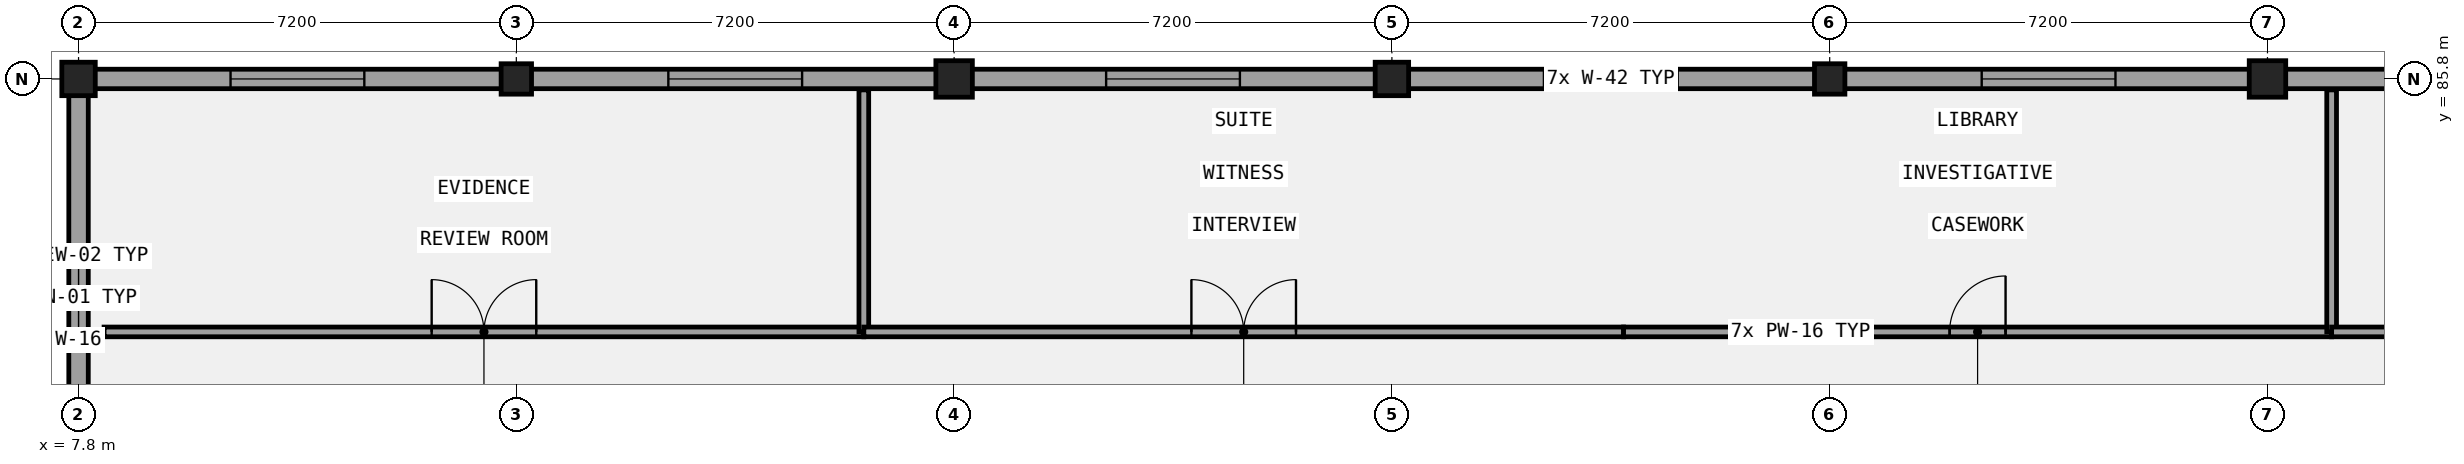
"""IFC4 building model, lengths in metres.
Left out: names, types, materials, properties, quantities, classifications, styles, units other than length and angle.
Written with IfcOpenShell. Run it as: python <this file> out.ifc"""

import sys

from ifc_helpers import new_model, si_unit, direction, frame, frame_2d, origin, origin_2d, place, context, subcontext, project, spatial, rectangle, extrude, element, fill, save


model = new_model("IFC4")
c1 = context("Model", 3, precision=1e-05, world=origin(), true_north=direction((0.0, 1.0)))
c2 = subcontext(c1, "Body", "Model", "MODEL_VIEW")
j1 = project(units=[si_unit("LENGTHUNIT", "METRE"), si_unit("PLANEANGLEUNIT", "RADIAN")], contexts=[c1])
p1 = place(None, origin())
s1 = spatial("IfcSite", under=j1, at=p1, CompositionType="ELEMENT")
p2 = place(p1, origin())
s2 = spatial("IfcBuilding", under=s1, at=p2, CompositionType="ELEMENT")
p3 = place(p2, frame((0.0, 0.0, 18.0)))
s3 = spatial("IfcBuildingStorey", under=s2, at=p3, CompositionType="ELEMENT", Elevation=18.0)
p4 = place(p3, frame((7.8, 85.8, 0.0), z_axis=(0.0, 0.0, 1.0), x_axis=(1.0, 0.0, 0.0)))
e1 = element("IfcColumn", 1, at=p4, inside=s3, PredefinedType="COLUMN", context=c2, shape_type="SweptSolid", body=[
    extrude(rectangle(XDim=0.55, YDim=0.55, at=origin_2d()), origin(), (0.0, 0.0, 1.0), 4.2),
])
p5 = place(p3, frame((15.0, 85.8, 0.0), z_axis=(0.0, 0.0, 1.0), x_axis=(1.0, 0.0, 0.0)))
e2 = element("IfcColumn", 2, at=p5, inside=s3, PredefinedType="COLUMN", context=c2, shape_type="SweptSolid", body=[
    extrude(rectangle(XDim=0.5, YDim=0.5, at=origin_2d()), origin(), (0.0, 0.0, 1.0), 4.2),
])
p6 = place(p3, frame((22.2, 85.8, 0.0), z_axis=(0.0, 0.0, 1.0), x_axis=(1.0, 0.0, 0.0)))
e3 = element("IfcColumn", 3, at=p6, inside=s3, PredefinedType="COLUMN", context=c2, shape_type="SweptSolid", body=[
    extrude(rectangle(XDim=0.6, YDim=0.6, at=origin_2d()), origin(), (0.0, 0.0, 1.0), 4.2),
])
p7 = place(p3, frame((29.4, 85.8, 0.0), z_axis=(0.0, 0.0, 1.0), x_axis=(1.0, 0.0, 0.0)))
e4 = element("IfcColumn", 4, at=p7, inside=s3, PredefinedType="COLUMN", context=c2, shape_type="SweptSolid", body=[
    extrude(rectangle(XDim=0.55, YDim=0.55, at=origin_2d()), origin(), (0.0, 0.0, 1.0), 4.2),
])
p8 = place(p3, frame((36.6, 85.8, 0.0), z_axis=(0.0, 0.0, 1.0), x_axis=(1.0, 0.0, 0.0)))
e5 = element("IfcColumn", 5, at=p8, inside=s3, PredefinedType="COLUMN", context=c2, shape_type="SweptSolid", body=[
    extrude(rectangle(XDim=0.5, YDim=0.5, at=origin_2d()), origin(), (0.0, 0.0, 1.0), 4.2),
])
p9 = place(p3, frame((43.8, 85.8, 0.0), z_axis=(0.0, 0.0, 1.0), x_axis=(1.0, 0.0, 0.0)))
e6 = element("IfcColumn", 6, at=p9, inside=s3, PredefinedType="COLUMN", context=c2, shape_type="SweptSolid", body=[
    extrude(rectangle(XDim=0.6, YDim=0.6, at=origin_2d()), origin(), (0.0, 0.0, 1.0), 4.2),
])
p10 = place(p3, frame((108.76, 85.8, 0.0), z_axis=(0.0, 0.0, 1.0), x_axis=(-1.0, 0.0, 0.0)))
e7 = element("IfcWall", 7, at=p10, inside=s3, PredefinedType="SOLIDWALL", context=c2, shape_type="SweptSolid", body=[
    extrude(rectangle(XDim=101.12, YDim=0.32, at=frame_2d((50.56, 0.0))), origin(), (0.0, 0.0, 1.0), 2.94),
])
p11 = place(p10, frame((96.26, 0.0, 1.0)))
e8 = element("IfcOpeningElement", 8, at=p11, cuts=e7, PredefinedType="OPENING", context=c2, shape_type="SweptSolid", body=[
    extrude(rectangle(XDim=2.2, YDim=1.65, at=frame_2d((1.1, 0.825))), frame((0.0, 0.17, 0.0), z_axis=(0.0, -1.0, 0.0), x_axis=(1.0, 0.0, 0.0)), (0.0, 0.0, 1.0), 0.34),
])
p12 = place(p10, frame((89.06, 0.0, 1.0)))
e9 = element("IfcOpeningElement", 9, at=p12, cuts=e7, PredefinedType="OPENING", context=c2, shape_type="SweptSolid", body=[
    extrude(rectangle(XDim=2.2, YDim=1.65, at=frame_2d((1.1, 0.825))), frame((0.0, 0.17, 0.0), z_axis=(0.0, -1.0, 0.0), x_axis=(1.0, 0.0, 0.0)), (0.0, 0.0, 1.0), 0.34),
])
p13 = place(p10, frame((81.86, 0.0, 1.0)))
e10 = element("IfcOpeningElement", 10, at=p13, cuts=e7, PredefinedType="OPENING", context=c2, shape_type="SweptSolid", body=[
    extrude(rectangle(XDim=2.2, YDim=1.65, at=frame_2d((1.1, 0.825))), frame((0.0, 0.17, 0.0), z_axis=(0.0, -1.0, 0.0), x_axis=(1.0, 0.0, 0.0)), (0.0, 0.0, 1.0), 0.34),
])
p14 = place(p10, frame((74.66, 0.0, 1.0)))
e11 = element("IfcOpeningElement", 11, at=p14, cuts=e7, PredefinedType="OPENING", context=c2, shape_type="SweptSolid", body=[
    extrude(rectangle(XDim=2.2, YDim=1.65, at=frame_2d((1.1, 0.825))), frame((0.0, 0.17, 0.0), z_axis=(0.0, -1.0, 0.0), x_axis=(1.0, 0.0, 0.0)), (0.0, 0.0, 1.0), 0.34),
])
p15 = place(p10, frame((67.46, 0.0, 1.0)))
e12 = element("IfcOpeningElement", 12, at=p15, cuts=e7, PredefinedType="OPENING", context=c2, shape_type="SweptSolid", body=[
    extrude(rectangle(XDim=2.2, YDim=1.65, at=frame_2d((1.1, 0.825))), frame((0.0, 0.17, 0.0), z_axis=(0.0, -1.0, 0.0), x_axis=(1.0, 0.0, 0.0)), (0.0, 0.0, 1.0), 0.34),
])
p16 = place(p10, frame((60.26, 0.0, 1.0)))
e13 = element("IfcOpeningElement", 13, at=p16, cuts=e7, PredefinedType="OPENING", context=c2, shape_type="SweptSolid", body=[
    extrude(rectangle(XDim=2.2, YDim=1.65, at=frame_2d((1.1, 0.825))), frame((0.0, 0.17, 0.0), z_axis=(0.0, -1.0, 0.0), x_axis=(1.0, 0.0, 0.0)), (0.0, 0.0, 1.0), 0.34),
])
p17 = place(p10, frame((53.06, 0.0, 1.0)))
e14 = element("IfcOpeningElement", 14, at=p17, cuts=e7, PredefinedType="OPENING", context=c2, shape_type="SweptSolid", body=[
    extrude(rectangle(XDim=2.2, YDim=1.65, at=frame_2d((1.1, 0.825))), frame((0.0, 0.17, 0.0), z_axis=(0.0, -1.0, 0.0), x_axis=(1.0, 0.0, 0.0)), (0.0, 0.0, 1.0), 0.34),
])
p18 = place(p10, frame((45.86, 0.0, 1.0)))
e15 = element("IfcOpeningElement", 15, at=p18, cuts=e7, PredefinedType="OPENING", context=c2, shape_type="SweptSolid", body=[
    extrude(rectangle(XDim=2.2, YDim=1.65, at=frame_2d((1.1, 0.825))), frame((0.0, 0.17, 0.0), z_axis=(0.0, -1.0, 0.0), x_axis=(1.0, 0.0, 0.0)), (0.0, 0.0, 1.0), 0.34),
])
p19 = place(p10, frame((38.66, 0.0, 1.0)))
e16 = element("IfcOpeningElement", 16, at=p19, cuts=e7, PredefinedType="OPENING", context=c2, shape_type="SweptSolid", body=[
    extrude(rectangle(XDim=2.2, YDim=1.65, at=frame_2d((1.1, 0.825))), frame((0.0, 0.17, 0.0), z_axis=(0.0, -1.0, 0.0), x_axis=(1.0, 0.0, 0.0)), (0.0, 0.0, 1.0), 0.34),
])
p20 = place(p10, frame((31.46, 0.0, 1.0)))
e17 = element("IfcOpeningElement", 17, at=p20, cuts=e7, PredefinedType="OPENING", context=c2, shape_type="SweptSolid", body=[
    extrude(rectangle(XDim=2.2, YDim=1.65, at=frame_2d((1.1, 0.825))), frame((0.0, 0.17, 0.0), z_axis=(0.0, -1.0, 0.0), x_axis=(1.0, 0.0, 0.0)), (0.0, 0.0, 1.0), 0.34),
])
p21 = place(p10, frame((24.26, 0.0, 1.0)))
e18 = element("IfcOpeningElement", 18, at=p21, cuts=e7, PredefinedType="OPENING", context=c2, shape_type="SweptSolid", body=[
    extrude(rectangle(XDim=2.2, YDim=1.65, at=frame_2d((1.1, 0.825))), frame((0.0, 0.17, 0.0), z_axis=(0.0, -1.0, 0.0), x_axis=(1.0, 0.0, 0.0)), (0.0, 0.0, 1.0), 0.34),
])
p22 = place(p10, frame((17.06, 0.0, 1.0)))
e19 = element("IfcOpeningElement", 19, at=p22, cuts=e7, PredefinedType="OPENING", context=c2, shape_type="SweptSolid", body=[
    extrude(rectangle(XDim=2.2, YDim=1.65, at=frame_2d((1.1, 0.825))), frame((0.0, 0.17, 0.0), z_axis=(0.0, -1.0, 0.0), x_axis=(1.0, 0.0, 0.0)), (0.0, 0.0, 1.0), 0.34),
])
p23 = place(p10, frame((9.86, 0.0, 1.0)))
e20 = element("IfcOpeningElement", 20, at=p23, cuts=e7, PredefinedType="OPENING", context=c2, shape_type="SweptSolid", body=[
    extrude(rectangle(XDim=2.2, YDim=1.65, at=frame_2d((1.1, 0.825))), frame((0.0, 0.17, 0.0), z_axis=(0.0, -1.0, 0.0), x_axis=(1.0, 0.0, 0.0)), (0.0, 0.0, 1.0), 0.34),
])
p24 = place(p10, frame((2.66, 0.0, 1.0)))
e21 = element("IfcOpeningElement", 21, at=p24, cuts=e7, PredefinedType="OPENING", context=c2, shape_type="SweptSolid", body=[
    extrude(rectangle(XDim=2.2, YDim=1.65, at=frame_2d((1.1, 0.825))), frame((0.0, 0.17, 0.0), z_axis=(0.0, -1.0, 0.0), x_axis=(1.0, 0.0, 0.0)), (0.0, 0.0, 1.0), 0.34),
])
p25 = place(p3, frame((7.8, 85.64, 0.0), z_axis=(0.0, 0.0, 1.0), x_axis=(0.0, -1.0, 0.0)))
e22 = element("IfcWall", 22, at=p25, inside=s3, PredefinedType="SOLIDWALL", context=c2, shape_type="SweptSolid", body=[
    extrude(rectangle(XDim=6.88, YDim=0.32, at=frame_2d((3.44, 0.0))), origin(), (0.0, 0.0, 1.0), 3.19),
])
p26 = place(p25, frame((2.79, 0.0, 1.0)))
e23 = element("IfcOpeningElement", 23, at=p26, cuts=e22, PredefinedType="OPENING", context=c2, shape_type="SweptSolid", body=[
    extrude(rectangle(XDim=1.3, YDim=1.4, at=frame_2d((0.65, 0.7))), frame((0.0, 0.17, 0.0), z_axis=(0.0, -1.0, 0.0), x_axis=(1.0, 0.0, 0.0)), (0.0, 0.0, 1.0), 0.34),
])
p27 = place(p3, frame((8.22, 81.64, 0.0), z_axis=(0.0, 0.0, 1.0), x_axis=(1.0, 0.0, 0.0)))
e24 = element("IfcWall", 24, at=p27, inside=s3, PredefinedType="PARTITIONING", context=c2, shape_type="SweptSolid", body=[
    extrude(rectangle(XDim=12.495, YDim=0.16, at=frame_2d((6.248, 0.0))), origin(), (0.0, 0.0, 1.0), 3.94),
])
p28 = place(p27, frame((5.387, 0.0, 0.0)))
e25 = element("IfcOpeningElement", 25, at=p28, cuts=e24, PredefinedType="OPENING", context=c2, shape_type="SweptSolid", body=[
    extrude(rectangle(XDim=1.72, YDim=2.22, at=frame_2d((0.86, 1.11))), frame((0.0, 0.09, 0.0), z_axis=(0.0, -1.0, 0.0), x_axis=(1.0, 0.0, 0.0)), (0.0, 0.0, 1.0), 0.18),
])
p29 = place(p3, frame((20.715, 81.64, 0.0), z_axis=(0.0, 0.0, 1.0), x_axis=(0.0, 1.0, 0.0)))
e26 = element("IfcWall", 26, at=p29, inside=s3, PredefinedType="PARTITIONING", context=c2, shape_type="SweptSolid", body=[
    extrude(rectangle(XDim=3.98, YDim=0.16, at=frame_2d((1.99, 0.0))), origin(), (0.0, 0.0, 1.0), 3.94),
])
p30 = place(p3, frame((20.715, 81.64, 0.0), z_axis=(0.0, 0.0, 1.0), x_axis=(1.0, 0.0, 0.0)))
e27 = element("IfcWall", 27, at=p30, inside=s3, PredefinedType="PARTITIONING", context=c2, shape_type="SweptSolid", body=[
    extrude(rectangle(XDim=12.495, YDim=0.16, at=frame_2d((6.248, 0.0))), origin(), (0.0, 0.0, 1.0), 3.94),
])
p31 = place(p30, frame((5.387, 0.0, 0.0)))
e28 = element("IfcOpeningElement", 28, at=p31, cuts=e27, PredefinedType="OPENING", context=c2, shape_type="SweptSolid", body=[
    extrude(rectangle(XDim=1.72, YDim=2.35, at=frame_2d((0.86, 1.175))), frame((0.0, 0.09, 0.0), z_axis=(0.0, -1.0, 0.0), x_axis=(1.0, 0.0, 0.0)), (0.0, 0.0, 1.0), 0.18),
])
p32 = place(p3, frame((33.21, 81.64, 0.0), z_axis=(0.0, 0.0, 1.0), x_axis=(1.0, 0.0, 0.0)))
e29 = element("IfcWall", 29, at=p32, inside=s3, PredefinedType="PARTITIONING", context=c2, shape_type="SweptSolid", body=[
    extrude(rectangle(XDim=11.645, YDim=0.16, at=frame_2d((5.823, 0.0))), origin(), (0.0, 0.0, 1.0), 3.94),
])
p33 = place(p32, frame((5.363, 0.0, 0.0)))
e30 = element("IfcOpeningElement", 30, at=p33, cuts=e29, PredefinedType="OPENING", context=c2, shape_type="SweptSolid", body=[
    extrude(rectangle(XDim=0.92, YDim=2.1, at=frame_2d((0.46, 1.05))), frame((0.0, 0.09, 0.0), z_axis=(0.0, -1.0, 0.0), x_axis=(1.0, 0.0, 0.0)), (0.0, 0.0, 1.0), 0.18),
])
p34 = place(p3, frame((44.855, 81.64, 0.0), z_axis=(0.0, 0.0, 1.0), x_axis=(0.0, 1.0, 0.0)))
e31 = element("IfcWall", 31, at=p34, inside=s3, PredefinedType="PARTITIONING", context=c2, shape_type="SweptSolid", body=[
    extrude(rectangle(XDim=3.98, YDim=0.16, at=frame_2d((1.99, 0.0))), origin(), (0.0, 0.0, 1.0), 3.94),
])
p35 = place(p3, frame((44.855, 81.64, 0.0), z_axis=(0.0, 0.0, 1.0), x_axis=(1.0, 0.0, 0.0)))
e32 = element("IfcWall", 32, at=p35, inside=s3, PredefinedType="PARTITIONING", context=c2, shape_type="SweptSolid", body=[
    extrude(rectangle(XDim=13.345, YDim=0.16, at=frame_2d((6.672, 0.0))), origin(), (0.0, 0.0, 1.0), 3.94),
])
p36 = place(p35, frame((6.212, 0.0, 0.0)))
e33 = element("IfcOpeningElement", 33, at=p36, cuts=e32, PredefinedType="OPENING", context=c2, shape_type="SweptSolid", body=[
    extrude(rectangle(XDim=0.92, YDim=2.22, at=frame_2d((0.46, 1.11))), frame((0.0, 0.09, 0.0), z_axis=(0.0, -1.0, 0.0), x_axis=(1.0, 0.0, 0.0)), (0.0, 0.0, 1.0), 0.18),
])
p37 = place(p11, origin())
e34 = element("IfcWindow", 34, at=p37, inside=s3, PartitioningType="SINGLE_PANEL", PredefinedType="WINDOW", context=c2, shape_type="SweptSolid", body=[
    extrude(rectangle(XDim=2.2, YDim=1.65, at=frame_2d((1.1, 0.825))), frame((0.0, 0.03, 0.0), z_axis=(0.0, -1.0, 0.0), x_axis=(1.0, 0.0, 0.0)), (0.0, 0.0, 1.0), 0.06),
])
fill(e8, e34)
p38 = place(p12, origin())
e35 = element("IfcWindow", 35, at=p38, inside=s3, PartitioningType="SINGLE_PANEL", PredefinedType="WINDOW", context=c2, shape_type="SweptSolid", body=[
    extrude(rectangle(XDim=2.2, YDim=1.65, at=frame_2d((1.1, 0.825))), frame((0.0, 0.03, 0.0), z_axis=(0.0, -1.0, 0.0), x_axis=(1.0, 0.0, 0.0)), (0.0, 0.0, 1.0), 0.06),
])
fill(e9, e35)
p39 = place(p13, origin())
e36 = element("IfcWindow", 36, at=p39, inside=s3, PartitioningType="SINGLE_PANEL", PredefinedType="WINDOW", context=c2, shape_type="SweptSolid", body=[
    extrude(rectangle(XDim=2.2, YDim=1.65, at=frame_2d((1.1, 0.825))), frame((0.0, 0.03, 0.0), z_axis=(0.0, -1.0, 0.0), x_axis=(1.0, 0.0, 0.0)), (0.0, 0.0, 1.0), 0.06),
])
fill(e10, e36)
p40 = place(p14, origin())
e37 = element("IfcWindow", 37, at=p40, inside=s3, PartitioningType="SINGLE_PANEL", PredefinedType="WINDOW", context=c2, shape_type="SweptSolid", body=[
    extrude(rectangle(XDim=2.2, YDim=1.65, at=frame_2d((1.1, 0.825))), frame((0.0, 0.03, 0.0), z_axis=(0.0, -1.0, 0.0), x_axis=(1.0, 0.0, 0.0)), (0.0, 0.0, 1.0), 0.06),
])
fill(e11, e37)
p41 = place(p15, origin())
e38 = element("IfcWindow", 38, at=p41, inside=s3, PartitioningType="SINGLE_PANEL", PredefinedType="WINDOW", context=c2, shape_type="SweptSolid", body=[
    extrude(rectangle(XDim=2.2, YDim=1.65, at=frame_2d((1.1, 0.825))), frame((0.0, 0.03, 0.0), z_axis=(0.0, -1.0, 0.0), x_axis=(1.0, 0.0, 0.0)), (0.0, 0.0, 1.0), 0.06),
])
fill(e12, e38)
p42 = place(p26, origin())
e39 = element("IfcWindow", 39, at=p42, inside=s3, PartitioningType="SINGLE_PANEL", PredefinedType="WINDOW", context=c2, shape_type="SweptSolid", body=[
    extrude(rectangle(XDim=1.3, YDim=1.4, at=frame_2d((0.65, 0.7))), frame((0.0, 0.03, 0.0), z_axis=(0.0, -1.0, 0.0), x_axis=(1.0, 0.0, 0.0)), (0.0, 0.0, 1.0), 0.06),
])
fill(e23, e39)
p43 = place(p28, origin())
e40 = element("IfcDoor", 40, at=p43, inside=s3, OperationType="DOUBLE_DOOR_SINGLE_SWING", PredefinedType="DOOR", context=c2, shape_type="SweptSolid", body=[
    extrude(rectangle(XDim=1.72, YDim=2.22, at=frame_2d((0.86, 1.11))), frame((0.0, 0.025, 0.0), z_axis=(0.0, -1.0, 0.0), x_axis=(1.0, 0.0, 0.0)), (0.0, 0.0, 1.0), 0.05),
])
fill(e25, e40)
p44 = place(p31, origin())
e41 = element("IfcDoor", 41, at=p44, inside=s3, OperationType="DOUBLE_DOOR_SINGLE_SWING", PredefinedType="DOOR", context=c2, shape_type="SweptSolid", body=[
    extrude(rectangle(XDim=1.72, YDim=2.35, at=frame_2d((0.86, 1.175))), frame((0.0, 0.025, 0.0), z_axis=(0.0, -1.0, 0.0), x_axis=(1.0, 0.0, 0.0)), (0.0, 0.0, 1.0), 0.05),
])
fill(e28, e41)
p45 = place(p33, origin())
e42 = element("IfcDoor", 42, at=p45, inside=s3, OperationType="SINGLE_SWING_RIGHT", PredefinedType="DOOR", context=c2, shape_type="SweptSolid", body=[
    extrude(rectangle(XDim=0.92, YDim=2.1, at=frame_2d((0.46, 1.05))), frame((0.0, 0.025, 0.0), z_axis=(0.0, -1.0, 0.0), x_axis=(1.0, 0.0, 0.0)), (0.0, 0.0, 1.0), 0.05),
])
fill(e30, e42)
save(model, sys.argv[1])
